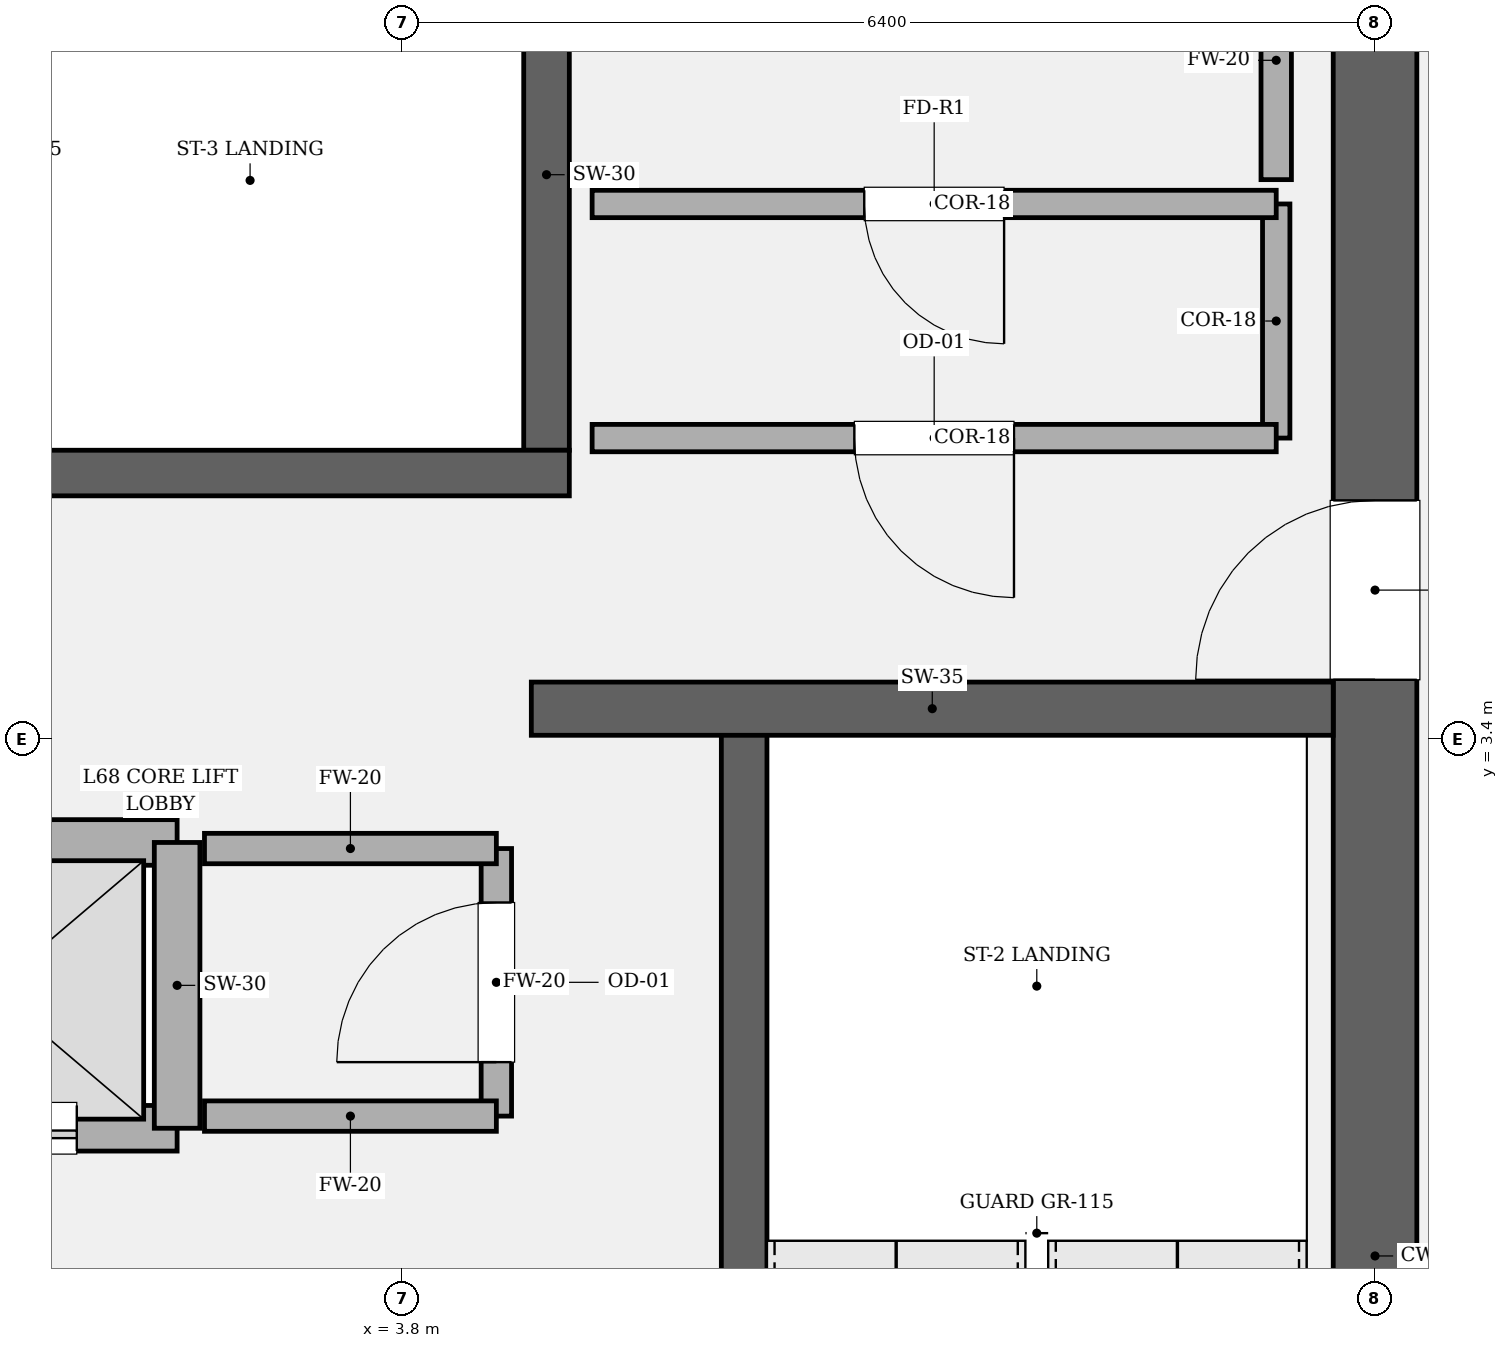
"""IFC4 building model, lengths in metres.
Left out: names, types, materials, properties, quantities, classifications, styles, units other than length and angle.
Written with IfcOpenShell. Run it as: python <this file> out.ifc"""

import sys

from ifc_helpers import new_model, si_unit, direction, frame, frame_2d, origin, place, context, subcontext, project, spatial, rectangle, extrude, element, fill, save


model = new_model("IFC4")
c1 = context("Model", 3, precision=1e-05, world=origin(), true_north=direction((0.0, 1.0)))
c2 = subcontext(c1, "Body", "Model", "MODEL_VIEW")
j1 = project(units=[si_unit("LENGTHUNIT", "METRE"), si_unit("PLANEANGLEUNIT", "RADIAN")], contexts=[c1])
p1 = place(None, origin())
s1 = spatial("IfcSite", under=j1, at=p1, CompositionType="ELEMENT")
p2 = place(p1, origin())
s2 = spatial("IfcBuilding", under=s1, at=p2, CompositionType="ELEMENT")
p3 = place(p2, frame((0.0, 0.0, 288.0)))
s3 = spatial("IfcBuildingStorey", under=s2, at=p3, CompositionType="ELEMENT", Elevation=288.0)
p4 = place(p3, frame((10.2, 8.925, 0.0), z_axis=(0.0, 0.0, 1.0), x_axis=(0.0, -1.0, 0.0)))
e1 = element("IfcWall", 1, at=p4, inside=s3, PredefinedType="SHEAR", context=c2, shape_type="SweptSolid", body=[
    extrude(rectangle(XDim=17.85, YDim=0.55, at=frame_2d((8.925, 0.0))), origin(), (0.0, 0.0, 1.0), 4.2),
])
p5 = place(p4, frame((3.955, 0.0, 0.0)))
e2 = element("IfcOpeningElement", 2, at=p5, cuts=e1, PredefinedType="OPENING", context=c2, shape_type="SweptSolid", body=[
    extrude(rectangle(XDim=1.18, YDim=2.2, at=frame_2d((0.59, 1.1))), frame((0.0, 0.285, 0.0), z_axis=(0.0, -1.0, 0.0), x_axis=(1.0, 0.0, 0.0)), (0.0, 0.0, 1.0), 0.57),
])
p6 = place(p3, frame((6.05, 3.45, 0.0), z_axis=(0.0, 0.0, 1.0), x_axis=(0.0, -1.0, 0.0)))
e3 = element("IfcWall", 3, at=p6, inside=s3, PredefinedType="SOLIDWALL", context=c2, shape_type="SweptSolid", body=[
    extrude(rectangle(XDim=8.95, YDim=0.3, at=frame_2d((4.475, 0.0))), origin(), (0.0, 0.0, 1.0), 4.2),
])
p7 = place(p3, frame((4.75, 8.925, 0.0), z_axis=(0.0, 0.0, 1.0), x_axis=(0.0, -1.0, 0.0)))
e4 = element("IfcWall", 4, at=p7, inside=s3, PredefinedType="SOLIDWALL", context=c2, shape_type="SweptSolid", body=[
    extrude(rectangle(XDim=3.625, YDim=0.3, at=frame_2d((1.812, 0.0))), origin(), (0.0, 0.0, 1.0), 4.2),
])
p8 = place(p3, frame((-4.9, 5.15, 0.0), z_axis=(0.0, 0.0, 1.0), x_axis=(1.0, 0.0, 0.0)))
e5 = element("IfcWall", 5, at=p8, inside=s3, PredefinedType="SOLIDWALL", context=c2, shape_type="SweptSolid", body=[
    extrude(rectangle(XDim=9.8, YDim=0.3, at=frame_2d((4.9, 0.0))), origin(), (0.0, 0.0, 1.0), 4.2),
])
p9 = place(p8, frame((0.56, 0.0, 0.0)))
e6 = element("IfcOpeningElement", 6, at=p9, cuts=e5, PredefinedType="OPENING", context=c2, shape_type="SweptSolid", body=[
    extrude(rectangle(XDim=1.18, YDim=2.2, at=frame_2d((0.59, 1.1))), frame((0.0, 0.16, 0.0), z_axis=(0.0, -1.0, 0.0), x_axis=(1.0, 0.0, 0.0)), (0.0, 0.0, 1.0), 0.32),
])
p10 = place(p3, frame((4.65, 3.6, 0.0), z_axis=(0.0, 0.0, 1.0), x_axis=(1.0, 0.0, 0.0)))
e7 = element("IfcWall", 7, at=p10, inside=s3, PredefinedType="SOLIDWALL", context=c2, shape_type="SweptSolid", body=[
    extrude(rectangle(XDim=5.275, YDim=0.35, at=frame_2d((2.638, 0.0))), origin(), (0.0, 0.0, 1.0), 4.2),
])
p11 = place(p3, frame((-2.32, 0.84, 0.0), z_axis=(0.0, 0.0, 1.0), x_axis=(1.0, 0.0, 0.0)))
e8 = element("IfcWall", 8, at=p11, inside=s3, PredefinedType="SOLIDWALL", context=c2, shape_type="SweptSolid", body=[
    extrude(rectangle(XDim=4.64, YDim=0.3, at=frame_2d((2.32, 0.0))), origin(), (0.0, 0.0, 1.0), 4.0),
])
p12 = place(p11, frame((0.66, 0.0, 0.0)))
e9 = element("IfcOpeningElement", 9, at=p12, cuts=e8, PredefinedType="OPENING", context=c2, shape_type="SweptSolid", body=[
    extrude(rectangle(XDim=1.12, YDim=2.25, at=frame_2d((0.56, 1.125))), frame((0.0, 0.16, 0.0), z_axis=(0.0, -1.0, 0.0), x_axis=(1.0, 0.0, 0.0)), (0.0, 0.0, 1.0), 0.32),
])
p13 = place(p11, frame((2.86, 0.0, 0.0)))
e10 = element("IfcOpeningElement", 10, at=p13, cuts=e8, PredefinedType="OPENING", context=c2, shape_type="SweptSolid", body=[
    extrude(rectangle(XDim=1.12, YDim=2.25, at=frame_2d((0.56, 1.125))), frame((0.0, 0.16, 0.0), z_axis=(0.0, -1.0, 0.0), x_axis=(1.0, 0.0, 0.0)), (0.0, 0.0, 1.0), 0.32),
])
p14 = place(p3, frame((-2.32, 2.72, 0.0), z_axis=(0.0, 0.0, 1.0), x_axis=(1.0, 0.0, 0.0)))
e11 = element("IfcWall", 11, at=p14, inside=s3, PredefinedType="SOLIDWALL", context=c2, shape_type="SweptSolid", body=[
    extrude(rectangle(XDim=4.64, YDim=0.3, at=frame_2d((2.32, 0.0))), origin(), (0.0, 0.0, 1.0), 4.0),
])
p15 = place(p3, frame((2.32, 0.84, 0.0), z_axis=(0.0, 0.0, 1.0), x_axis=(0.0, 1.0, 0.0)))
e12 = element("IfcWall", 12, at=p15, inside=s3, PredefinedType="SOLIDWALL", context=c2, shape_type="SweptSolid", body=[
    extrude(rectangle(XDim=1.88, YDim=0.3, at=frame_2d((0.94, 0.0))), origin(), (0.0, 0.0, 1.0), 4.0),
])
p16 = place(p3, frame((4.42, 0.92, 0.0), z_axis=(0.0, 0.0, 1.0), x_axis=(0.0, 1.0, 0.0)))
e13 = element("IfcWall", 13, at=p16, inside=s3, PredefinedType="SOLIDWALL", context=c2, shape_type="SweptSolid", body=[
    extrude(rectangle(XDim=1.76, YDim=0.2, at=frame_2d((0.88, 0.0))), origin(), (0.0, 0.0, 1.0), 4.0),
])
p17 = place(p16, frame((0.355, 0.0, 0.0)))
e14 = element("IfcOpeningElement", 14, at=p17, cuts=e13, PredefinedType="OPENING", context=c2, shape_type="SweptSolid", body=[
    extrude(rectangle(XDim=1.05, YDim=2.2, at=frame_2d((0.525, 1.1))), frame((0.0, 0.11, 0.0), z_axis=(0.0, -1.0, 0.0), x_axis=(1.0, 0.0, 0.0)), (0.0, 0.0, 1.0), 0.22),
])
for number, where, z_axis, x_axis in (
    (15, (4.42, 2.68, 0.0), (0.0, 0.0, 1.0), (-1.0, 0.0, 0.0)),
    (16, (2.5, 0.92, 0.0), (0.0, 0.0, 1.0), (1.0, 0.0, 0.0)),
):
    element("IfcWall", number, at=place(p3, frame(where, z_axis=z_axis, x_axis=x_axis)), inside=s3, PredefinedType="SOLIDWALL", context=c2, shape_type="SweptSolid", body=[
        extrude(rectangle(XDim=1.92, YDim=0.2, at=frame_2d((0.96, 0.0))), origin(), (0.0, 0.0, 1.0), 4.0),
    ])
p18 = place(p3, frame((9.55, 5.38, 0.0), z_axis=(0.0, 0.0, 1.0), x_axis=(0.0, 1.0, 0.0)))
e17 = element("IfcWall", 17, at=p18, inside=s3, PredefinedType="PARTITIONING", context=c2, shape_type="SweptSolid", body=[
    extrude(rectangle(XDim=1.54, YDim=0.18, at=frame_2d((0.77, 0.0))), origin(), (0.0, 0.0, 1.0), 4.0),
])
p19 = place(p3, frame((9.55, 6.92, 0.0), z_axis=(0.0, 0.0, 1.0), x_axis=(-1.0, 0.0, 0.0)))
e18 = element("IfcWall", 18, at=p19, inside=s3, PredefinedType="PARTITIONING", context=c2, shape_type="SweptSolid", body=[
    extrude(rectangle(XDim=4.5, YDim=0.18, at=frame_2d((2.25, 0.0))), origin(), (0.0, 0.0, 1.0), 4.0),
])
p20 = place(p19, frame((1.79, 0.0, 0.0)))
e19 = element("IfcOpeningElement", 19, at=p20, cuts=e18, PredefinedType="OPENING", context=c2, shape_type="SweptSolid", body=[
    extrude(rectangle(XDim=0.92, YDim=2.1, at=frame_2d((0.46, 1.05))), frame((0.0, 0.1, 0.0), z_axis=(0.0, -1.0, 0.0), x_axis=(1.0, 0.0, 0.0)), (0.0, 0.0, 1.0), 0.2),
])
p21 = place(p3, frame((5.05, 5.38, 0.0), z_axis=(0.0, 0.0, 1.0), x_axis=(1.0, 0.0, 0.0)))
e20 = element("IfcWall", 20, at=p21, inside=s3, PredefinedType="PARTITIONING", context=c2, shape_type="SweptSolid", body=[
    extrude(rectangle(XDim=4.5, YDim=0.18, at=frame_2d((2.25, 0.0))), origin(), (0.0, 0.0, 1.0), 4.0),
])
p22 = place(p21, frame((1.725, 0.0, 0.0)))
e21 = element("IfcOpeningElement", 21, at=p22, cuts=e20, PredefinedType="OPENING", context=c2, shape_type="SweptSolid", body=[
    extrude(rectangle(XDim=1.05, YDim=2.2, at=frame_2d((0.525, 1.1))), frame((0.0, 0.1, 0.0), z_axis=(0.0, -1.0, 0.0), x_axis=(1.0, 0.0, 0.0)), (0.0, 0.0, 1.0), 0.2),
])
p23 = place(p3, frame((9.55, 7.08, 0.0), z_axis=(0.0, 0.0, 1.0), x_axis=(0.0, 1.0, 0.0)))
e22 = element("IfcWall", 22, at=p23, inside=s3, PredefinedType="SOLIDWALL", context=c2, shape_type="SweptSolid", body=[
    extrude(rectangle(XDim=1.57, YDim=0.2, at=frame_2d((0.785, 0.0))), origin(), (0.0, 0.0, 1.0), 4.0),
])
p24 = place(p5, origin())
e23 = element("IfcDoor", 23, at=p24, inside=s3, OperationType="SINGLE_SWING_RIGHT", PredefinedType="DOOR", context=c2, shape_type="SweptSolid", body=[
    extrude(rectangle(XDim=1.18, YDim=2.2, at=frame_2d((0.59, 1.1))), frame((0.0, 0.025, 0.0), z_axis=(0.0, -1.0, 0.0), x_axis=(1.0, 0.0, 0.0)), (0.0, 0.0, 1.0), 0.05),
])
fill(e2, e23)
p25 = place(p13, origin())
e24 = element("IfcDoor", 24, at=p25, inside=s3, OperationType="DOUBLE_DOOR_SLIDING", PredefinedType="DOOR", context=c2, shape_type="SweptSolid", body=[
    extrude(rectangle(XDim=1.12, YDim=2.25, at=frame_2d((0.56, 1.125))), frame((0.0, 0.025, 0.0), z_axis=(0.0, -1.0, 0.0), x_axis=(1.0, 0.0, 0.0)), (0.0, 0.0, 1.0), 0.05),
])
fill(e10, e24)
p26 = place(p17, origin())
e25 = element("IfcDoor", 25, at=p26, inside=s3, OperationType="SINGLE_SWING_LEFT", PredefinedType="DOOR", context=c2, shape_type="SweptSolid", body=[
    extrude(rectangle(XDim=1.05, YDim=2.2, at=frame_2d((0.525, 1.1))), frame((0.0, 0.025, 0.0), z_axis=(0.0, -1.0, 0.0), x_axis=(1.0, 0.0, 0.0)), (0.0, 0.0, 1.0), 0.05),
])
fill(e14, e25)
p27 = place(p22, origin())
e26 = element("IfcDoor", 26, at=p27, inside=s3, OperationType="SINGLE_SWING_RIGHT", PredefinedType="DOOR", context=c2, shape_type="SweptSolid", body=[
    extrude(rectangle(XDim=1.05, YDim=2.2, at=frame_2d((0.525, 1.1))), frame((0.0, 0.025, 0.0), z_axis=(0.0, -1.0, 0.0), x_axis=(1.0, 0.0, 0.0)), (0.0, 0.0, 1.0), 0.05),
])
fill(e21, e26)
p28 = place(p20, origin())
e27 = element("IfcDoor", 27, at=p28, inside=s3, OperationType="SINGLE_SWING_LEFT", PredefinedType="DOOR", context=c2, shape_type="SweptSolid", body=[
    extrude(rectangle(XDim=0.92, YDim=2.1, at=frame_2d((0.46, 1.05))), frame((0.0, 0.025, 0.0), z_axis=(0.0, -1.0, 0.0), x_axis=(1.0, 0.0, 0.0)), (0.0, 0.0, 1.0), 0.05),
])
fill(e19, e27)
save(model, sys.argv[1])
